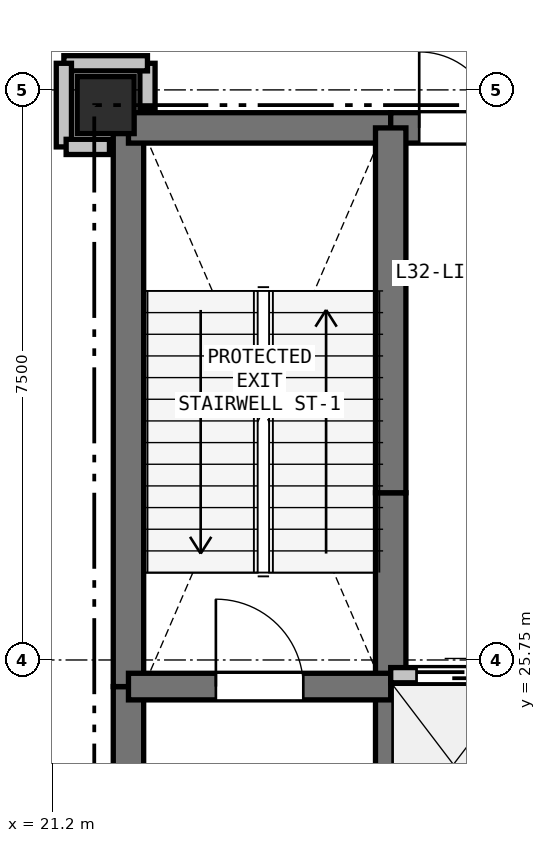
"""IFC4 building model, lengths in metres.
Left out: names, types, materials, properties, quantities, classifications, styles, units other than length and angle.
Written with IfcOpenShell. Run it as: python <this file> out.ifc"""

import sys

from ifc_helpers import new_model, si_unit, direction, frame, frame_2d, origin, origin_2d, place, context, subcontext, project, spatial, rectangle, extrude, element, fill, save


model = new_model("IFC4")
c1 = context("Model", 3, precision=1e-05, world=origin(), true_north=direction((0.0, 1.0)))
c2 = subcontext(c1, "Body", "Model", "MODEL_VIEW")
j1 = project(units=[si_unit("LENGTHUNIT", "METRE"), si_unit("PLANEANGLEUNIT", "RADIAN")], contexts=[c1])
p1 = place(None, origin())
s1 = spatial("IfcSite", under=j1, at=p1, CompositionType="ELEMENT")
p2 = place(p1, origin())
s2 = spatial("IfcBuilding", under=s1, at=p2, CompositionType="ELEMENT")
p3 = place(p2, frame((0.0, 0.0, 116.4)))
s3 = spatial("IfcBuildingStorey", under=s2, at=p3, CompositionType="ELEMENT", Elevation=116.4)
p4 = place(p3, frame((21.9, 33.05, 0.0), z_axis=(0.0, 0.0, 1.0), x_axis=(1.0, 0.0, 0.0)))
e1 = element("IfcColumn", 1, at=p4, inside=s3, PredefinedType="COLUMN", context=c2, shape_type="SweptSolid", body=[
    extrude(rectangle(XDim=0.75, YDim=0.75, at=origin_2d()), origin(), (0.0, 0.0, 1.0), 4.8),
])
p5 = place(p3, frame((22.2, 20.75, 0.0), z_axis=(0.0, 0.0, 1.0), x_axis=(0.0, 1.0, 0.0)))
e2 = element("IfcWall", 2, at=p5, inside=s3, PredefinedType="SHEAR", context=c2, shape_type="SweptSolid", body=[
    extrude(rectangle(XDim=4.65, YDim=0.4, at=frame_2d((2.325, 0.0))), origin(), (0.0, 0.0, 1.0), 4.56),
])
p6 = place(p3, frame((22.2, 25.4, 0.0), z_axis=(0.0, 0.0, 1.0), x_axis=(0.0, 1.0, 0.0)))
e3 = element("IfcWall", 3, at=p6, inside=s3, PredefinedType="SHEAR", context=c2, shape_type="SweptSolid", body=[
    extrude(rectangle(XDim=7.35, YDim=0.4, at=frame_2d((3.675, 0.0))), origin(), (0.0, 0.0, 1.0), 4.56),
])
p7 = place(p3, frame((22.2, 32.75, 0.0), z_axis=(0.0, 0.0, 1.0), x_axis=(1.0, 0.0, 0.0)))
e4 = element("IfcWall", 4, at=p7, inside=s3, PredefinedType="SHEAR", context=c2, shape_type="SweptSolid", body=[
    extrude(rectangle(XDim=3.45, YDim=0.4, at=frame_2d((1.725, 0.0))), origin(), (0.0, 0.0, 1.0), 4.56),
])
p8 = place(p3, frame((25.65, 32.75, 0.0), z_axis=(0.0, 0.0, 1.0), x_axis=(1.0, 0.0, 0.0)))
e5 = element("IfcWall", 5, at=p8, inside=s3, PredefinedType="SHEAR", context=c2, shape_type="SweptSolid", body=[
    extrude(rectangle(XDim=1.75, YDim=0.4, at=frame_2d((0.875, 0.0))), origin(), (0.0, 0.0, 1.0), 4.56),
])
p9 = place(p8, frame((0.375, 0.0, 0.0)))
e6 = element("IfcOpeningElement", 6, at=p9, cuts=e5, PredefinedType="OPENING", context=c2, shape_type="SweptSolid", body=[
    extrude(rectangle(XDim=1.0, YDim=2.15, at=frame_2d((0.5, 1.075))), frame((0.0, 0.21, 0.0), z_axis=(0.0, -1.0, 0.0), x_axis=(1.0, 0.0, 0.0)), (0.0, 0.0, 1.0), 0.42),
])
p10 = place(p3, frame((25.65, 22.75, 0.0), z_axis=(0.0, 0.0, 1.0), x_axis=(0.0, 1.0, 0.0)))
e7 = element("IfcWall", 7, at=p10, inside=s3, PredefinedType="SHEAR", context=c2, shape_type="SweptSolid", body=[
    extrude(rectangle(XDim=2.8, YDim=0.4, at=frame_2d((1.4, 0.0))), origin(), (0.0, 0.0, 1.0), 4.56),
])
p11 = place(p3, frame((25.65, 25.55, 0.0), z_axis=(0.0, 0.0, 1.0), x_axis=(0.0, 1.0, 0.0)))
e8 = element("IfcWall", 8, at=p11, inside=s3, PredefinedType="SHEAR", context=c2, shape_type="SweptSolid", body=[
    extrude(rectangle(XDim=2.4, YDim=0.4, at=frame_2d((1.2, 0.0))), origin(), (0.0, 0.0, 1.0), 4.56),
])
p12 = place(p3, frame((25.65, 27.95, 0.0), z_axis=(0.0, 0.0, 1.0), x_axis=(0.0, 1.0, 0.0)))
e9 = element("IfcWall", 9, at=p12, inside=s3, PredefinedType="SHEAR", context=c2, shape_type="SweptSolid", body=[
    extrude(rectangle(XDim=4.8, YDim=0.4, at=frame_2d((2.4, 0.0))), origin(), (0.0, 0.0, 1.0), 4.56),
])
p13 = place(p3, frame((22.2, 25.4, 0.0), z_axis=(0.0, 0.0, 1.0), x_axis=(1.0, 0.0, 0.0)))
e10 = element("IfcWall", 10, at=p13, inside=s3, PredefinedType="SHEAR", context=c2, shape_type="SweptSolid", body=[
    extrude(rectangle(XDim=3.45, YDim=0.35, at=frame_2d((1.725, 0.0))), origin(), (0.0, 0.0, 1.0), 4.56),
])
p14 = place(p13, frame((1.15, 0.0, 0.0)))
e11 = element("IfcOpeningElement", 11, at=p14, cuts=e10, PredefinedType="OPENING", context=c2, shape_type="SweptSolid", body=[
    extrude(rectangle(XDim=1.15, YDim=2.15, at=frame_2d((0.575, 1.075))), frame((0.0, 0.185, 0.0), z_axis=(0.0, -1.0, 0.0), x_axis=(1.0, 0.0, 0.0)), (0.0, 0.0, 1.0), 0.37),
])
p15 = place(p3, frame((25.65, 25.55, 0.0), z_axis=(0.0, 0.0, 1.0), x_axis=(1.0, 0.0, 0.0)))
e12 = element("IfcWall", 12, at=p15, inside=s3, PredefinedType="PARTITIONING", context=c2, shape_type="SweptSolid", body=[
    extrude(rectangle(XDim=4.95, YDim=0.2, at=frame_2d((2.475, 0.0))), origin(), (0.0, 0.0, 1.0), 4.56),
])
p16 = place(p15, frame((0.34, 0.0, 0.0)))
e13 = element("IfcOpeningElement", 13, at=p16, cuts=e12, PredefinedType="OPENING", context=c2, shape_type="SweptSolid", body=[
    extrude(rectangle(XDim=1.1, YDim=2.15, at=frame_2d((0.55, 1.075))), frame((0.0, 0.11, 0.0), z_axis=(0.0, -1.0, 0.0), x_axis=(1.0, 0.0, 0.0)), (0.0, 0.0, 1.0), 0.22),
])
p17 = place(p15, frame((1.99, 0.0, 0.0)))
e14 = element("IfcOpeningElement", 14, at=p17, cuts=e12, PredefinedType="OPENING", context=c2, shape_type="SweptSolid", body=[
    extrude(rectangle(XDim=1.1, YDim=2.15, at=frame_2d((0.55, 1.075))), frame((0.0, 0.11, 0.0), z_axis=(0.0, -1.0, 0.0), x_axis=(1.0, 0.0, 0.0)), (0.0, 0.0, 1.0), 0.22),
])
p18 = place(p15, frame((3.64, 0.0, 0.0)))
e15 = element("IfcOpeningElement", 15, at=p18, cuts=e12, PredefinedType="OPENING", context=c2, shape_type="SweptSolid", body=[
    extrude(rectangle(XDim=1.1, YDim=2.15, at=frame_2d((0.55, 1.075))), frame((0.0, 0.11, 0.0), z_axis=(0.0, -1.0, 0.0), x_axis=(1.0, 0.0, 0.0)), (0.0, 0.0, 1.0), 0.22),
])
p19 = place(p3, frame((22.45, 33.0, 0.0), z_axis=(0.0, 0.0, 1.0), x_axis=(0.0, 1.0, 0.0)))
e16 = element("IfcWall", 16, at=p19, inside=s3, PredefinedType="PARTITIONING", context=c2, shape_type="SweptSolid", body=[
    extrude(rectangle(XDim=0.6, YDim=0.2, at=frame_2d((0.3, 0.0))), origin(), (0.0, 0.0, 1.0), 4.008),
])
p20 = place(p3, frame((22.45, 33.6, 0.0), z_axis=(0.0, 0.0, 1.0), x_axis=(-1.0, 0.0, 0.0)))
e17 = element("IfcWall", 17, at=p20, inside=s3, PredefinedType="PARTITIONING", context=c2, shape_type="SweptSolid", body=[
    extrude(rectangle(XDim=1.1, YDim=0.2, at=frame_2d((0.55, 0.0))), origin(), (0.0, 0.0, 1.0), 4.56),
])
p21 = place(p3, frame((21.35, 33.6, 0.0), z_axis=(0.0, 0.0, 1.0), x_axis=(0.0, -1.0, 0.0)))
e18 = element("IfcWall", 18, at=p21, inside=s3, PredefinedType="PARTITIONING", context=c2, shape_type="SweptSolid", body=[
    extrude(rectangle(XDim=1.1, YDim=0.2, at=frame_2d((0.55, 0.0))), origin(), (0.0, 0.0, 1.0), 4.56),
])
p22 = place(p3, frame((21.38, 32.5, 0.0), z_axis=(0.0, 0.0, 1.0), x_axis=(1.0, 0.0, 0.0)))
e19 = element("IfcWall", 19, at=p22, inside=s3, PredefinedType="PARTITIONING", context=c2, shape_type="SweptSolid", body=[
    extrude(rectangle(XDim=0.57, YDim=0.2, at=frame_2d((0.285, 0.0))), origin(), (0.0, 0.0, 1.0), 4.008),
])
p23 = place(p16, origin())
e20 = element("IfcDoor", 20, at=p23, inside=s3, OperationType="SLIDING_TO_LEFT", PredefinedType="DOOR", context=c2, shape_type="SweptSolid", body=[
    extrude(rectangle(XDim=1.1, YDim=2.15, at=frame_2d((0.55, 1.075))), frame((0.0, 0.025, 0.0), z_axis=(0.0, -1.0, 0.0), x_axis=(1.0, 0.0, 0.0)), (0.0, 0.0, 1.0), 0.05),
])
fill(e13, e20)
p24 = place(p9, origin())
e21 = element("IfcDoor", 21, at=p24, inside=s3, OperationType="SINGLE_SWING_LEFT", PredefinedType="DOOR", context=c2, shape_type="SweptSolid", body=[
    extrude(rectangle(XDim=1.0, YDim=2.15, at=frame_2d((0.5, 1.075))), frame((0.0, 0.025, 0.0), z_axis=(0.0, -1.0, 0.0), x_axis=(1.0, 0.0, 0.0)), (0.0, 0.0, 1.0), 0.05),
])
fill(e6, e21)
p25 = place(p14, origin())
e22 = element("IfcDoor", 22, at=p25, inside=s3, OperationType="SINGLE_SWING_LEFT", PredefinedType="DOOR", context=c2, shape_type="SweptSolid", body=[
    extrude(rectangle(XDim=1.15, YDim=2.15, at=frame_2d((0.575, 1.075))), frame((0.0, 0.025, 0.0), z_axis=(0.0, -1.0, 0.0), x_axis=(1.0, 0.0, 0.0)), (0.0, 0.0, 1.0), 0.05),
])
fill(e11, e22)
save(model, sys.argv[1])
